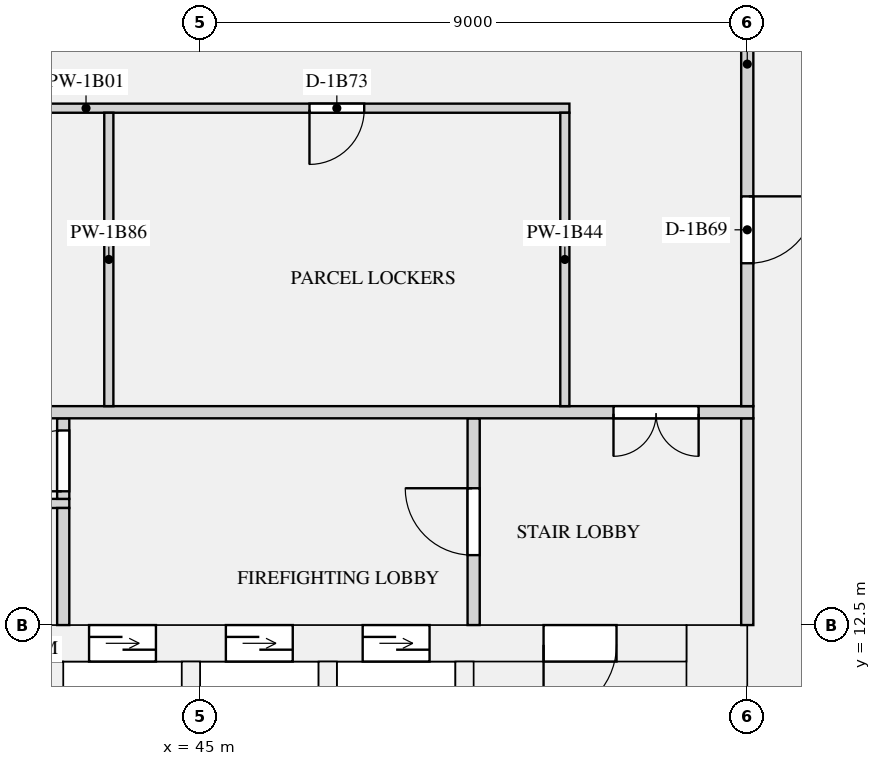
"""IFC4 building model, lengths in metres.
Left out: names, types, materials, properties, quantities, classifications, styles, units other than length and angle.
Written with IfcOpenShell. Run it as: python <this file> out.ifc"""

import sys

from ifc_helpers import new_model, si_unit, direction, frame, frame_2d, origin, place, context, subcontext, project, spatial, rectangle, extrude, element, fill, save


model = new_model("IFC4")
c1 = context("Model", 3, precision=1e-05, world=origin(), true_north=direction((0.0, 1.0)))
c2 = subcontext(c1, "Body", "Model", "MODEL_VIEW")
j1 = project(units=[si_unit("LENGTHUNIT", "METRE"), si_unit("PLANEANGLEUNIT", "RADIAN")], contexts=[c1])
p1 = place(None, origin())
s1 = spatial("IfcSite", under=j1, at=p1, CompositionType="ELEMENT")
p2 = place(p1, origin())
s2 = spatial("IfcBuilding", under=s1, at=p2, CompositionType="ELEMENT")
p3 = place(p2, frame((0.0, 0.0, 28.95)))
s3 = spatial("IfcBuildingStorey", under=s2, at=p3, CompositionType="ELEMENT", Elevation=28.95)
p4 = place(p3, frame((53.5, 0.0, 0.0), z_axis=(0.0, 0.0, 1.0), x_axis=(0.0, 1.0, 0.0)))
e1 = element("IfcWall", 1, at=p4, inside=s3, PredefinedType="SHEAR", context=c2, shape_type="SweptSolid", body=[
    extrude(rectangle(XDim=12.5, YDim=1.0, at=frame_2d((6.25, 0.0))), origin(), (0.0, 0.0, 1.0), 3.15),
])
p5 = place(p3, frame((19.0, 12.2, 0.0), z_axis=(0.0, 0.0, 1.0), x_axis=(1.0, 0.0, 0.0)))
e2 = element("IfcWall", 2, at=p5, inside=s3, PredefinedType="SHEAR", context=c2, shape_type="SweptSolid", body=[
    extrude(rectangle(XDim=34.0, YDim=0.6, at=frame_2d((17.0, 0.0))), origin(), (0.0, 0.0, 1.0), 3.15),
])
p6 = place(p5, frame((4.475, 0.0, 0.0)))
e3 = element("IfcOpeningElement", 3, at=p6, cuts=e2, PredefinedType="OPENING", context=c2, shape_type="SweptSolid", body=[
    extrude(rectangle(XDim=1.2, YDim=2.1, at=frame_2d((0.6, 1.05))), frame((0.0, 0.31, 0.0), z_axis=(0.0, -1.0, 0.0), x_axis=(1.0, 0.0, 0.0)), (0.0, 0.0, 1.0), 0.62),
])
p7 = place(p5, frame((7.325, 0.0, 0.0)))
e4 = element("IfcOpeningElement", 4, at=p7, cuts=e2, PredefinedType="OPENING", context=c2, shape_type="SweptSolid", body=[
    extrude(rectangle(XDim=1.2, YDim=2.1, at=frame_2d((0.6, 1.05))), frame((0.0, 0.31, 0.0), z_axis=(0.0, -1.0, 0.0), x_axis=(1.0, 0.0, 0.0)), (0.0, 0.0, 1.0), 0.62),
])
p8 = place(p5, frame((10.175, 0.0, 0.0)))
e5 = element("IfcOpeningElement", 5, at=p8, cuts=e2, PredefinedType="OPENING", context=c2, shape_type="SweptSolid", body=[
    extrude(rectangle(XDim=1.2, YDim=2.1, at=frame_2d((0.6, 1.05))), frame((0.0, 0.31, 0.0), z_axis=(0.0, -1.0, 0.0), x_axis=(1.0, 0.0, 0.0)), (0.0, 0.0, 1.0), 0.62),
])
p9 = place(p5, frame((13.025, 0.0, 0.0)))
e6 = element("IfcOpeningElement", 6, at=p9, cuts=e2, PredefinedType="OPENING", context=c2, shape_type="SweptSolid", body=[
    extrude(rectangle(XDim=1.2, YDim=2.1, at=frame_2d((0.6, 1.05))), frame((0.0, 0.31, 0.0), z_axis=(0.0, -1.0, 0.0), x_axis=(1.0, 0.0, 0.0)), (0.0, 0.0, 1.0), 0.62),
])
p10 = place(p5, frame((15.875, 0.0, 0.0)))
e7 = element("IfcOpeningElement", 7, at=p10, cuts=e2, PredefinedType="OPENING", context=c2, shape_type="SweptSolid", body=[
    extrude(rectangle(XDim=1.2, YDim=2.1, at=frame_2d((0.6, 1.05))), frame((0.0, 0.31, 0.0), z_axis=(0.0, -1.0, 0.0), x_axis=(1.0, 0.0, 0.0)), (0.0, 0.0, 1.0), 0.62),
])
p11 = place(p5, frame((24.175, 0.0, 0.0)))
e8 = element("IfcOpeningElement", 8, at=p11, cuts=e2, PredefinedType="OPENING", context=c2, shape_type="SweptSolid", body=[
    extrude(rectangle(XDim=1.1, YDim=2.1, at=frame_2d((0.55, 1.05))), frame((0.0, 0.31, 0.0), z_axis=(0.0, -1.0, 0.0), x_axis=(1.0, 0.0, 0.0)), (0.0, 0.0, 1.0), 0.62),
])
p12 = place(p5, frame((26.425, 0.0, 0.0)))
e9 = element("IfcOpeningElement", 9, at=p12, cuts=e2, PredefinedType="OPENING", context=c2, shape_type="SweptSolid", body=[
    extrude(rectangle(XDim=1.1, YDim=2.1, at=frame_2d((0.55, 1.05))), frame((0.0, 0.31, 0.0), z_axis=(0.0, -1.0, 0.0), x_axis=(1.0, 0.0, 0.0)), (0.0, 0.0, 1.0), 0.62),
])
p13 = place(p5, frame((28.675, 0.0, 0.0)))
e10 = element("IfcOpeningElement", 10, at=p13, cuts=e2, PredefinedType="OPENING", context=c2, shape_type="SweptSolid", body=[
    extrude(rectangle(XDim=1.1, YDim=2.1, at=frame_2d((0.55, 1.05))), frame((0.0, 0.31, 0.0), z_axis=(0.0, -1.0, 0.0), x_axis=(1.0, 0.0, 0.0)), (0.0, 0.0, 1.0), 0.62),
])
p14 = place(p5, frame((1.15, 0.0, 0.0)))
e11 = element("IfcOpeningElement", 11, at=p14, cuts=e2, PredefinedType="OPENING", context=c2, shape_type="SweptSolid", body=[
    extrude(rectangle(XDim=1.2, YDim=2.1, at=frame_2d((0.6, 1.05))), frame((0.0, 0.31, 0.0), z_axis=(0.0, -1.0, 0.0), x_axis=(1.0, 0.0, 0.0)), (0.0, 0.0, 1.0), 0.62),
])
p15 = place(p5, frame((31.65, 0.0, 0.0)))
e12 = element("IfcOpeningElement", 12, at=p15, cuts=e2, PredefinedType="OPENING", context=c2, shape_type="SweptSolid", body=[
    extrude(rectangle(XDim=1.2, YDim=2.1, at=frame_2d((0.6, 1.05))), frame((0.0, 0.31, 0.0), z_axis=(0.0, -1.0, 0.0), x_axis=(1.0, 0.0, 0.0)), (0.0, 0.0, 1.0), 0.62),
])
for number, where, z_axis, x_axis in (
    (13, (42.6, 8.25, 0.0), (0.0, 0.0, 1.0), (0.0, 1.0, 0.0)),
    (14, (44.85, 8.25, 0.0), (0.0, 0.0, 1.0), (0.0, 1.0, 0.0)),
    (15, (47.1, 8.25, 0.0), (0.0, 0.0, 1.0), (0.0, 1.0, 0.0)),
    (16, (49.35, 8.25, 0.0), (0.0, 0.0, 1.0), (0.0, 1.0, 0.0)),
):
    element("IfcWall", number, at=place(p3, frame(where, z_axis=z_axis, x_axis=x_axis)), inside=s3, PredefinedType="SHEAR", context=c2, shape_type="SweptSolid", body=[
        extrude(rectangle(XDim=3.65, YDim=0.3, at=frame_2d((1.825, 0.0))), origin(), (0.0, 0.0, 1.0), 3.15),
    ])
p16 = place(p3, frame((38.925, 14.5, 0.0), z_axis=(0.0, 0.0, 1.0), x_axis=(1.0, 0.0, 0.0)))
e17 = element("IfcWall", 17, at=p16, inside=s3, PredefinedType="PARTITIONING", context=c2, shape_type="SweptSolid", body=[
    extrude(rectangle(XDim=3.925, YDim=0.15, at=frame_2d((1.962, 0.0))), origin(), (0.0, 0.0, 1.0), 2.83),
])
p17 = place(p16, frame((0.575, 0.0, 0.0)))
e18 = element("IfcOpeningElement", 18, at=p17, cuts=e17, PredefinedType="OPENING", context=c2, shape_type="SweptSolid", body=[
    extrude(rectangle(XDim=0.9, YDim=2.1, at=frame_2d((0.45, 1.05))), frame((0.0, 0.085, 0.0), z_axis=(0.0, -1.0, 0.0), x_axis=(1.0, 0.0, 0.0)), (0.0, 0.0, 1.0), 0.17),
])
p18 = place(p16, frame((2.45, 0.0, 0.0)))
e19 = element("IfcOpeningElement", 19, at=p18, cuts=e17, PredefinedType="OPENING", context=c2, shape_type="SweptSolid", body=[
    extrude(rectangle(XDim=0.9, YDim=2.1, at=frame_2d((0.45, 1.05))), frame((0.0, 0.085, 0.0), z_axis=(0.0, -1.0, 0.0), x_axis=(1.0, 0.0, 0.0)), (0.0, 0.0, 1.0), 0.17),
])
p19 = place(p3, frame((42.75, 12.5, 0.0), z_axis=(0.0, 0.0, 1.0), x_axis=(0.0, 1.0, 0.0)))
e20 = element("IfcWall", 20, at=p19, inside=s3, PredefinedType="PARTITIONING", context=c2, shape_type="SweptSolid", body=[
    extrude(rectangle(XDim=1.925, YDim=0.2, at=frame_2d((0.962, 0.0))), origin(), (0.0, 0.0, 1.0), 2.83),
])
p20 = place(p3, frame((49.5, 12.5, 0.0), z_axis=(0.0, 0.0, 1.0), x_axis=(0.0, 1.0, 0.0)))
e21 = element("IfcWall", 21, at=p20, inside=s3, PredefinedType="PARTITIONING", context=c2, shape_type="SweptSolid", body=[
    extrude(rectangle(XDim=3.4, YDim=0.2, at=frame_2d((1.7, 0.0))), origin(), (0.0, 0.0, 1.0), 2.83),
])
p21 = place(p20, frame((1.15, 0.0, 0.0)))
e22 = element("IfcOpeningElement", 22, at=p21, cuts=e21, PredefinedType="OPENING", context=c2, shape_type="SweptSolid", body=[
    extrude(rectangle(XDim=1.1, YDim=2.1, at=frame_2d((0.55, 1.05))), frame((0.0, 0.11, 0.0), z_axis=(0.0, -1.0, 0.0), x_axis=(1.0, 0.0, 0.0)), (0.0, 0.0, 1.0), 0.22),
])
p22 = place(p3, frame((54.0, 12.5, 0.0), z_axis=(0.0, 0.0, 1.0), x_axis=(0.0, 1.0, 0.0)))
e23 = element("IfcWall", 23, at=p22, inside=s3, PredefinedType="PARTITIONING", context=c2, shape_type="SweptSolid", body=[
    extrude(rectangle(XDim=3.4, YDim=0.2, at=frame_2d((1.7, 0.0))), origin(), (0.0, 0.0, 1.0), 2.83),
])
p23 = place(p3, frame((42.75, 14.575, 0.0), z_axis=(0.0, 0.0, 1.0), x_axis=(0.0, 1.0, 0.0)))
e24 = element("IfcWall", 24, at=p23, inside=s3, PredefinedType="PARTITIONING", context=c2, shape_type="SweptSolid", body=[
    extrude(rectangle(XDim=1.325, YDim=0.2, at=frame_2d((0.663, 0.0))), origin(), (0.0, 0.0, 1.0), 2.83),
])
p24 = place(p23, frame((0.125, 0.0, 0.0)))
e25 = element("IfcOpeningElement", 25, at=p24, cuts=e24, PredefinedType="OPENING", context=c2, shape_type="SweptSolid", body=[
    extrude(rectangle(XDim=1.0, YDim=2.1, at=frame_2d((0.5, 1.05))), frame((0.0, 0.11, 0.0), z_axis=(0.0, -1.0, 0.0), x_axis=(1.0, 0.0, 0.0)), (0.0, 0.0, 1.0), 0.22),
])
p25 = place(p3, frame((20.925, 21.0, 0.0), z_axis=(0.0, 0.0, 1.0), x_axis=(1.0, 0.0, 0.0)))
e26 = element("IfcWall", 26, at=p25, inside=s3, PredefinedType="PARTITIONING", context=c2, shape_type="SweptSolid", body=[
    extrude(rectangle(XDim=30.15, YDim=0.15, at=frame_2d((15.075, 0.0))), origin(), (0.0, 0.0, 1.0), 2.83),
])
p26 = place(p25, frame((3.375, 0.0, 0.0)))
e27 = element("IfcOpeningElement", 27, at=p26, cuts=e26, PredefinedType="OPENING", context=c2, shape_type="SweptSolid", body=[
    extrude(rectangle(XDim=0.9, YDim=2.1, at=frame_2d((0.45, 1.05))), frame((0.0, 0.085, 0.0), z_axis=(0.0, -1.0, 0.0), x_axis=(1.0, 0.0, 0.0)), (0.0, 0.0, 1.0), 0.17),
])
p27 = place(p25, frame((10.125, 0.0, 0.0)))
e28 = element("IfcOpeningElement", 28, at=p27, cuts=e26, PredefinedType="OPENING", context=c2, shape_type="SweptSolid", body=[
    extrude(rectangle(XDim=0.9, YDim=2.1, at=frame_2d((0.45, 1.05))), frame((0.0, 0.085, 0.0), z_axis=(0.0, -1.0, 0.0), x_axis=(1.0, 0.0, 0.0)), (0.0, 0.0, 1.0), 0.17),
])
p28 = place(p25, frame((17.625, 0.0, 0.0)))
e29 = element("IfcOpeningElement", 29, at=p28, cuts=e26, PredefinedType="OPENING", context=c2, shape_type="SweptSolid", body=[
    extrude(rectangle(XDim=0.9, YDim=2.1, at=frame_2d((0.45, 1.05))), frame((0.0, 0.085, 0.0), z_axis=(0.0, -1.0, 0.0), x_axis=(1.0, 0.0, 0.0)), (0.0, 0.0, 1.0), 0.17),
])
p29 = place(p25, frame((25.875, 0.0, 0.0)))
e30 = element("IfcOpeningElement", 30, at=p29, cuts=e26, PredefinedType="OPENING", context=c2, shape_type="SweptSolid", body=[
    extrude(rectangle(XDim=0.9, YDim=2.1, at=frame_2d((0.45, 1.05))), frame((0.0, 0.085, 0.0), z_axis=(0.0, -1.0, 0.0), x_axis=(1.0, 0.0, 0.0)), (0.0, 0.0, 1.0), 0.17),
])
p30 = place(p3, frame((17.9, 16.0, 0.0), z_axis=(0.0, 0.0, 1.0), x_axis=(1.0, 0.0, 0.0)))
e31 = element("IfcWall", 31, at=p30, inside=s3, PredefinedType="PARTITIONING", context=c2, shape_type="SweptSolid", body=[
    extrude(rectangle(XDim=36.2, YDim=0.2, at=frame_2d((18.1, 0.0))), origin(), (0.0, 0.0, 1.0), 2.83),
])
p31 = place(p30, frame((0.9, 0.0, 0.0)))
e32 = element("IfcOpeningElement", 32, at=p31, cuts=e31, PredefinedType="OPENING", context=c2, shape_type="SweptSolid", body=[
    extrude(rectangle(XDim=1.4, YDim=2.1, at=frame_2d((0.7, 1.05))), frame((0.0, 0.11, 0.0), z_axis=(0.0, -1.0, 0.0), x_axis=(1.0, 0.0, 0.0)), (0.0, 0.0, 1.0), 0.22),
])
p32 = place(p30, frame((33.9, 0.0, 0.0)))
e33 = element("IfcOpeningElement", 33, at=p32, cuts=e31, PredefinedType="OPENING", context=c2, shape_type="SweptSolid", body=[
    extrude(rectangle(XDim=1.4, YDim=2.1, at=frame_2d((0.7, 1.05))), frame((0.0, 0.11, 0.0), z_axis=(0.0, -1.0, 0.0), x_axis=(1.0, 0.0, 0.0)), (0.0, 0.0, 1.0), 0.22),
])
p33 = place(p3, frame((54.0, 16.1, 0.0), z_axis=(0.0, 0.0, 1.0), x_axis=(0.0, 1.0, 0.0)))
e34 = element("IfcWall", 34, at=p33, inside=s3, PredefinedType="PARTITIONING", context=c2, shape_type="SweptSolid", body=[
    extrude(rectangle(XDim=7.8, YDim=0.2, at=frame_2d((3.9, 0.0))), origin(), (0.0, 0.0, 1.0), 2.83),
])
p34 = place(p33, frame((2.35, 0.0, 0.0)))
e35 = element("IfcOpeningElement", 35, at=p34, cuts=e34, PredefinedType="OPENING", context=c2, shape_type="SweptSolid", body=[
    extrude(rectangle(XDim=1.1, YDim=2.1, at=frame_2d((0.55, 1.05))), frame((0.0, 0.11, 0.0), z_axis=(0.0, -1.0, 0.0), x_axis=(1.0, 0.0, 0.0)), (0.0, 0.0, 1.0), 0.22),
])
for number, where, z_axis, x_axis in (
    (36, (51.0, 16.1, 0.0), (0.0, 0.0, 1.0), (0.0, 1.0, 0.0)),
    (37, (43.5, 16.1, 0.0), (0.0, 0.0, 1.0), (0.0, 1.0, 0.0)),
):
    element("IfcWall", number, at=place(p3, frame(where, z_axis=z_axis, x_axis=x_axis)), inside=s3, PredefinedType="PARTITIONING", context=c2, shape_type="SweptSolid", body=[
        extrude(rectangle(XDim=4.825, YDim=0.15, at=frame_2d((2.413, 0.0))), origin(), (0.0, 0.0, 1.0), 2.83),
    ])
p35 = place(p11, origin())
e38 = element("IfcDoor", 38, at=p35, inside=s3, OperationType="DOUBLE_DOOR_SLIDING", PredefinedType="DOOR", context=c2, shape_type="SweptSolid", body=[
    extrude(rectangle(XDim=1.1, YDim=2.1, at=frame_2d((0.55, 1.05))), frame((0.0, 0.025, 0.0), z_axis=(0.0, -1.0, 0.0), x_axis=(1.0, 0.0, 0.0)), (0.0, 0.0, 1.0), 0.05),
])
fill(e8, e38)
p36 = place(p12, origin())
e39 = element("IfcDoor", 39, at=p36, inside=s3, OperationType="DOUBLE_DOOR_SLIDING", PredefinedType="DOOR", context=c2, shape_type="SweptSolid", body=[
    extrude(rectangle(XDim=1.1, YDim=2.1, at=frame_2d((0.55, 1.05))), frame((0.0, 0.025, 0.0), z_axis=(0.0, -1.0, 0.0), x_axis=(1.0, 0.0, 0.0)), (0.0, 0.0, 1.0), 0.05),
])
fill(e9, e39)
p37 = place(p13, origin())
e40 = element("IfcDoor", 40, at=p37, inside=s3, OperationType="DOUBLE_DOOR_SLIDING", PredefinedType="DOOR", context=c2, shape_type="SweptSolid", body=[
    extrude(rectangle(XDim=1.1, YDim=2.1, at=frame_2d((0.55, 1.05))), frame((0.0, 0.025, 0.0), z_axis=(0.0, -1.0, 0.0), x_axis=(1.0, 0.0, 0.0)), (0.0, 0.0, 1.0), 0.05),
])
fill(e10, e40)
p38 = place(p15, frame((1.2, 0.0, 0.0), z_axis=(0.0, 0.0, 1.0), x_axis=(-1.0, 0.0, 0.0)))
e41 = element("IfcDoor", 41, at=p38, inside=s3, OperationType="SINGLE_SWING_RIGHT", PredefinedType="DOOR", context=c2, shape_type="SweptSolid", body=[
    extrude(rectangle(XDim=1.2, YDim=2.1, at=frame_2d((0.6, 1.05))), frame((0.0, 0.025, 0.0), z_axis=(0.0, -1.0, 0.0), x_axis=(1.0, 0.0, 0.0)), (0.0, 0.0, 1.0), 0.05),
])
fill(e12, e41)
p39 = place(p24, origin())
e42 = element("IfcDoor", 42, at=p39, inside=s3, OperationType="SINGLE_SWING_LEFT", PredefinedType="DOOR", context=c2, shape_type="SweptSolid", body=[
    extrude(rectangle(XDim=1.0, YDim=2.1, at=frame_2d((0.5, 1.05))), frame((0.0, 0.025, 0.0), z_axis=(0.0, -1.0, 0.0), x_axis=(1.0, 0.0, 0.0)), (0.0, 0.0, 1.0), 0.05),
])
fill(e25, e42)
p40 = place(p21, origin())
e43 = element("IfcDoor", 43, at=p40, inside=s3, OperationType="SINGLE_SWING_RIGHT", PredefinedType="DOOR", context=c2, shape_type="SweptSolid", body=[
    extrude(rectangle(XDim=1.1, YDim=2.1, at=frame_2d((0.55, 1.05))), frame((0.0, 0.025, 0.0), z_axis=(0.0, -1.0, 0.0), x_axis=(1.0, 0.0, 0.0)), (0.0, 0.0, 1.0), 0.05),
])
fill(e22, e43)
p41 = place(p32, frame((1.4, 0.0, 0.0), z_axis=(0.0, 0.0, 1.0), x_axis=(-1.0, 0.0, 0.0)))
e44 = element("IfcDoor", 44, at=p41, inside=s3, OperationType="DOUBLE_DOOR_SINGLE_SWING", PredefinedType="DOOR", context=c2, shape_type="SweptSolid", body=[
    extrude(rectangle(XDim=1.4, YDim=2.1, at=frame_2d((0.7, 1.05))), frame((0.0, 0.025, 0.0), z_axis=(0.0, -1.0, 0.0), x_axis=(1.0, 0.0, 0.0)), (0.0, 0.0, 1.0), 0.05),
])
fill(e33, e44)
p42 = place(p34, frame((1.1, 0.0, 0.0), z_axis=(0.0, 0.0, 1.0), x_axis=(-1.0, 0.0, 0.0)))
e45 = element("IfcDoor", 45, at=p42, inside=s3, OperationType="SINGLE_SWING_LEFT", PredefinedType="DOOR", context=c2, shape_type="SweptSolid", body=[
    extrude(rectangle(XDim=1.1, YDim=2.1, at=frame_2d((0.55, 1.05))), frame((0.0, 0.025, 0.0), z_axis=(0.0, -1.0, 0.0), x_axis=(1.0, 0.0, 0.0)), (0.0, 0.0, 1.0), 0.05),
])
fill(e35, e45)
p43 = place(p29, frame((0.9, 0.0, 0.0), z_axis=(0.0, 0.0, 1.0), x_axis=(-1.0, 0.0, 0.0)))
e46 = element("IfcDoor", 46, at=p43, inside=s3, OperationType="SINGLE_SWING_RIGHT", PredefinedType="DOOR", context=c2, shape_type="SweptSolid", body=[
    extrude(rectangle(XDim=0.9, YDim=2.1, at=frame_2d((0.45, 1.05))), frame((0.0, 0.025, 0.0), z_axis=(0.0, -1.0, 0.0), x_axis=(1.0, 0.0, 0.0)), (0.0, 0.0, 1.0), 0.05),
])
fill(e30, e46)
save(model, sys.argv[1])
